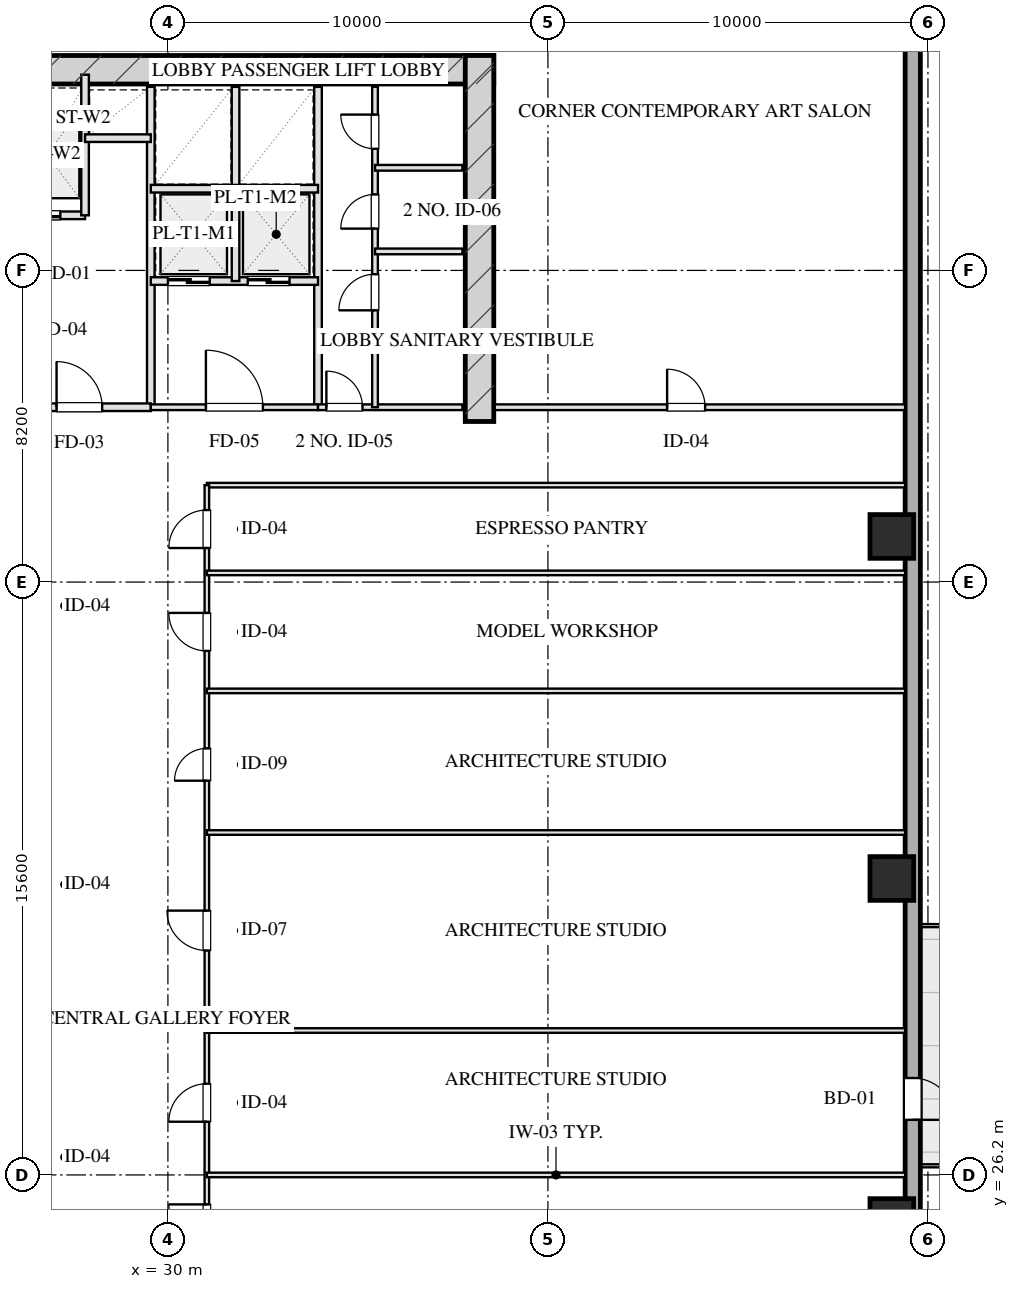
"""IFC4 building model, lengths in metres.
Left out: names, types, materials, properties, quantities, classifications, styles, units other than length and angle.
Written with IfcOpenShell. Run it as: python <this file> out.ifc"""

import sys

from ifc_helpers import new_model, si_unit, direction, frame, frame_2d, origin, origin_2d, place, context, subcontext, project, spatial, rectangle, hollow_rectangle, extrude, element, fill, save


model = new_model("IFC4")
c1 = context("Model", 3, precision=1e-05, world=origin(), true_north=direction((0.0, 1.0)))
c2 = subcontext(c1, "Body", "Model", "MODEL_VIEW")
j1 = project(units=[si_unit("LENGTHUNIT", "METRE"), si_unit("PLANEANGLEUNIT", "RADIAN")], contexts=[c1])
p1 = place(None, origin())
s1 = spatial("IfcSite", under=j1, at=p1, CompositionType="ELEMENT")
p2 = place(p1, origin())
s2 = spatial("IfcBuilding", under=s1, at=p2, CompositionType="ELEMENT")
p3 = place(p2, frame((0.0, 0.0, 60.95)))
s3 = spatial("IfcBuildingStorey", under=s2, at=p3, CompositionType="ELEMENT", Elevation=60.95)
p4 = place(p3, frame((21.425, 55.28, 0.0), z_axis=(0.0, 0.0, 1.0), x_axis=(1.0, 0.0, 0.0)))
e1 = element("IfcWall", 1, at=p4, inside=s3, PredefinedType="SHEAR", context=c2, shape_type="SweptSolid", body=[
    extrude(rectangle(XDim=17.15, YDim=0.75, at=frame_2d((8.575, 0.0))), origin(), (0.0, 0.0, 1.0), 3.45),
])
p5 = place(p3, frame((38.2, 46.025, 0.0), z_axis=(0.0, 0.0, 1.0), x_axis=(0.0, 1.0, 0.0)))
e2 = element("IfcWall", 2, at=p5, inside=s3, PredefinedType="SHEAR", context=c2, shape_type="SweptSolid", body=[
    extrude(rectangle(XDim=9.63, YDim=0.75, at=frame_2d((4.815, 0.0))), origin(), (0.0, 0.0, 1.0), 3.45),
])
for number, where, z_axis, x_axis in (
    (3, (49.05, 25.0, 0.0), (0.0, 0.0, 1.0), (1.0, 0.0, 0.0)),
    (4, (49.05, 34.0, 0.0), (0.0, 0.0, 1.0), (1.0, 0.0, 0.0)),
    (5, (49.05, 43.0, 0.0), (0.0, 0.0, 1.0), (1.0, 0.0, 0.0)),
):
    element("IfcColumn", number, at=place(p3, frame(where, z_axis=z_axis, x_axis=x_axis)), inside=s3, PredefinedType="COLUMN", context=c2, shape_type="SweptSolid", body=[
        extrude(hollow_rectangle(XDim=1.15, YDim=1.15, WallThickness=0.04, at=origin_2d()), origin(), (0.0, 0.0, 1.0), 3.451),
    ])
p6 = place(p3, frame((49.6, 60.8, 0.0), z_axis=(0.0, 0.0, 1.0), x_axis=(0.0, -1.0, 0.0)))
e6 = element("IfcWall", 6, at=p6, inside=s3, PredefinedType="SOLIDWALL", context=c2, shape_type="SweptSolid", body=[
    extrude(rectangle(XDim=53.6, YDim=0.4, at=frame_2d((26.8, 0.0))), origin(), (0.0, 0.0, 1.0), 2.61),
])
p7 = place(p6, frame((32.05, 0.0, 0.0)))
e7 = element("IfcOpeningElement", 7, at=p7, cuts=e6, PredefinedType="OPENING", context=c2, shape_type="SweptSolid", body=[
    extrude(rectangle(XDim=1.1, YDim=2.15, at=frame_2d((0.55, 1.075))), frame((0.0, 0.21, 0.0), z_axis=(0.0, -1.0, 0.0), x_axis=(1.0, 0.0, 0.0)), (0.0, 0.0, 1.0), 0.42),
])
p8 = place(p3, frame((29.55, 46.4, 0.0), z_axis=(0.0, 0.0, 1.0), x_axis=(0.0, 1.0, 0.0)))
e8 = element("IfcWall", 8, at=p8, inside=s3, PredefinedType="PARTITIONING", context=c2, shape_type="SweptSolid", body=[
    extrude(rectangle(XDim=8.43, YDim=0.2, at=frame_2d((4.215, 0.0))), origin(), (0.0, 0.0, 1.0), 3.175),
])
p9 = place(p3, frame((25.72, 46.4, 0.0), z_axis=(0.0, 0.0, 1.0), x_axis=(1.0, 0.0, 0.0)))
e9 = element("IfcWall", 9, at=p9, inside=s3, PredefinedType="PARTITIONING", context=c2, shape_type="SweptSolid", body=[
    extrude(rectangle(XDim=3.83, YDim=0.2, at=frame_2d((1.915, 0.0))), origin(), (0.0, 0.0, 1.0), 3.175),
])
p10 = place(p9, frame((1.35, 0.0, 0.0)))
e10 = element("IfcOpeningElement", 10, at=p10, cuts=e9, PredefinedType="OPENING", context=c2, shape_type="SweptSolid", body=[
    extrude(rectangle(XDim=1.2, YDim=2.05, at=frame_2d((0.6, 1.025))), frame((0.0, 0.11, 0.0), z_axis=(0.0, -1.0, 0.0), x_axis=(1.0, 0.0, 0.0)), (0.0, 0.0, 1.0), 0.22),
])
p11 = place(p3, frame((25.72, 51.45, 0.0), z_axis=(0.0, 0.0, 1.0), x_axis=(1.0, 0.0, 0.0)))
e11 = element("IfcWall", 11, at=p11, inside=s3, PredefinedType="PARTITIONING", context=c2, shape_type="SweptSolid", body=[
    extrude(rectangle(XDim=2.1, YDim=0.2, at=frame_2d((1.05, 0.0))), origin(), (0.0, 0.0, 1.0), 3.175),
])
p12 = place(p11, frame((0.35, 0.0, 0.0)))
e12 = element("IfcOpeningElement", 12, at=p12, cuts=e11, PredefinedType="OPENING", context=c2, shape_type="SweptSolid", body=[
    extrude(rectangle(XDim=1.1, YDim=2.05, at=frame_2d((0.55, 1.025))), frame((0.0, 0.11, 0.0), z_axis=(0.0, -1.0, 0.0), x_axis=(1.0, 0.0, 0.0)), (0.0, 0.0, 1.0), 0.22),
])
p13 = place(p3, frame((27.82, 51.45, 0.0), z_axis=(0.0, 0.0, 1.0), x_axis=(0.0, 1.0, 0.0)))
e13 = element("IfcWall", 13, at=p13, inside=s3, PredefinedType="PARTITIONING", context=c2, shape_type="SweptSolid", body=[
    extrude(rectangle(XDim=3.7, YDim=0.2, at=frame_2d((1.85, 0.0))), origin(), (0.0, 0.0, 1.0), 3.175),
])
p14 = place(p3, frame((27.82, 53.48, 0.0), z_axis=(0.0, 0.0, 1.0), x_axis=(1.0, 0.0, 0.0)))
e14 = element("IfcWall", 14, at=p14, inside=s3, PredefinedType="PARTITIONING", context=c2, shape_type="SweptSolid", body=[
    extrude(rectangle(XDim=1.73, YDim=0.2, at=frame_2d((0.865, 0.0))), origin(), (0.0, 0.0, 1.0), 3.175),
])
p15 = place(p3, frame((33.95, 46.4, 0.0), z_axis=(0.0, 0.0, 1.0), x_axis=(0.0, 1.0, 0.0)))
e15 = element("IfcWall", 15, at=p15, inside=s3, PredefinedType="PARTITIONING", context=c2, shape_type="SweptSolid", body=[
    extrude(rectangle(XDim=8.43, YDim=0.2, at=frame_2d((4.215, 0.0))), origin(), (0.0, 0.0, 1.0), 3.175),
])
p16 = place(p3, frame((29.55, 46.4, 0.0), z_axis=(0.0, 0.0, 1.0), x_axis=(1.0, 0.0, 0.0)))
e16 = element("IfcWall", 16, at=p16, inside=s3, PredefinedType="PARTITIONING", context=c2, shape_type="SweptSolid", body=[
    extrude(rectangle(XDim=4.4, YDim=0.15, at=frame_2d((2.2, 0.0))), origin(), (0.0, 0.0, 1.0), 3.175),
])
p17 = place(p16, frame((1.45, 0.0, 0.0)))
e17 = element("IfcOpeningElement", 17, at=p17, cuts=e16, PredefinedType="OPENING", context=c2, shape_type="SweptSolid", body=[
    extrude(rectangle(XDim=1.5, YDim=2.05, at=frame_2d((0.75, 1.025))), frame((0.0, 0.085, 0.0), z_axis=(0.0, -1.0, 0.0), x_axis=(1.0, 0.0, 0.0)), (0.0, 0.0, 1.0), 0.17),
])
p18 = place(p3, frame((29.55, 49.72, 0.0), z_axis=(0.0, 0.0, 1.0), x_axis=(1.0, 0.0, 0.0)))
e18 = element("IfcWall", 18, at=p18, inside=s3, PredefinedType="PARTITIONING", context=c2, shape_type="SweptSolid", body=[
    extrude(rectangle(XDim=4.4, YDim=0.2, at=frame_2d((2.2, 0.0))), origin(), (0.0, 0.0, 1.0), 3.175),
])
p19 = place(p18, frame((0.45, 0.0, 0.0)))
e19 = element("IfcOpeningElement", 19, at=p19, cuts=e18, PredefinedType="OPENING", context=c2, shape_type="SweptSolid", body=[
    extrude(rectangle(XDim=1.1, YDim=2.05, at=frame_2d((0.55, 1.025))), frame((0.0, 0.11, 0.0), z_axis=(0.0, -1.0, 0.0), x_axis=(1.0, 0.0, 0.0)), (0.0, 0.0, 1.0), 0.22),
])
p20 = place(p18, frame((2.55, 0.0, 0.0)))
e20 = element("IfcOpeningElement", 20, at=p20, cuts=e18, PredefinedType="OPENING", context=c2, shape_type="SweptSolid", body=[
    extrude(rectangle(XDim=1.1, YDim=2.05, at=frame_2d((0.55, 1.025))), frame((0.0, 0.11, 0.0), z_axis=(0.0, -1.0, 0.0), x_axis=(1.0, 0.0, 0.0)), (0.0, 0.0, 1.0), 0.22),
])
p21 = place(p3, frame((31.78, 49.72, 0.0), z_axis=(0.0, 0.0, 1.0), x_axis=(0.0, 1.0, 0.0)))
e21 = element("IfcWall", 21, at=p21, inside=s3, PredefinedType="PARTITIONING", context=c2, shape_type="SweptSolid", body=[
    extrude(rectangle(XDim=5.11, YDim=0.2, at=frame_2d((2.555, 0.0))), origin(), (0.0, 0.0, 1.0), 3.175),
])
p22 = place(p3, frame((29.55, 52.15, 0.0), z_axis=(0.0, 0.0, 1.0), x_axis=(1.0, 0.0, 0.0)))
e22 = element("IfcWall", 22, at=p22, inside=s3, PredefinedType="PARTITIONING", context=c2, shape_type="SweptSolid", body=[
    extrude(rectangle(XDim=4.4, YDim=0.2, at=frame_2d((2.2, 0.0))), origin(), (0.0, 0.0, 1.0), 3.175),
])
p23 = place(p3, frame((33.95, 46.4, 0.0), z_axis=(0.0, 0.0, 1.0), x_axis=(1.0, 0.0, 0.0)))
e23 = element("IfcWall", 23, at=p23, inside=s3, PredefinedType="PARTITIONING", context=c2, shape_type="SweptSolid", body=[
    extrude(rectangle(XDim=3.8, YDim=0.15, at=frame_2d((1.9, 0.0))), origin(), (0.0, 0.0, 1.0), 3.175),
])
p24 = place(p23, frame((0.22, 0.0, 0.0)))
e24 = element("IfcOpeningElement", 24, at=p24, cuts=e23, PredefinedType="OPENING", context=c2, shape_type="SweptSolid", body=[
    extrude(rectangle(XDim=0.95, YDim=2.05, at=frame_2d((0.475, 1.025))), frame((0.0, 0.085, 0.0), z_axis=(0.0, -1.0, 0.0), x_axis=(1.0, 0.0, 0.0)), (0.0, 0.0, 1.0), 0.17),
])
p25 = place(p3, frame((35.45, 46.4, 0.0), z_axis=(0.0, 0.0, 1.0), x_axis=(0.0, 1.0, 0.0)))
e25 = element("IfcWall", 25, at=p25, inside=s3, PredefinedType="PARTITIONING", context=c2, shape_type="SweptSolid", body=[
    extrude(rectangle(XDim=8.43, YDim=0.15, at=frame_2d((4.215, 0.0))), origin(), (0.0, 0.0, 1.0), 2.765),
])
p26 = place(p25, frame((2.55, 0.0, 0.0)))
e26 = element("IfcOpeningElement", 26, at=p26, cuts=e25, PredefinedType="OPENING", context=c2, shape_type="SweptSolid", body=[
    extrude(rectangle(XDim=0.95, YDim=2.05, at=frame_2d((0.475, 1.025))), frame((0.0, 0.085, 0.0), z_axis=(0.0, -1.0, 0.0), x_axis=(1.0, 0.0, 0.0)), (0.0, 0.0, 1.0), 0.17),
])
p27 = place(p25, frame((4.7, 0.0, 0.0)))
e27 = element("IfcOpeningElement", 27, at=p27, cuts=e25, PredefinedType="OPENING", context=c2, shape_type="SweptSolid", body=[
    extrude(rectangle(XDim=0.9, YDim=2.05, at=frame_2d((0.45, 1.025))), frame((0.0, 0.085, 0.0), z_axis=(0.0, -1.0, 0.0), x_axis=(1.0, 0.0, 0.0)), (0.0, 0.0, 1.0), 0.17),
])
p28 = place(p25, frame((6.8, 0.0, 0.0)))
e28 = element("IfcOpeningElement", 28, at=p28, cuts=e25, PredefinedType="OPENING", context=c2, shape_type="SweptSolid", body=[
    extrude(rectangle(XDim=0.9, YDim=2.05, at=frame_2d((0.45, 1.025))), frame((0.0, 0.085, 0.0), z_axis=(0.0, -1.0, 0.0), x_axis=(1.0, 0.0, 0.0)), (0.0, 0.0, 1.0), 0.17),
])
for number, where, z_axis, x_axis in (
    (29, (35.45, 50.5, 0.0), (0.0, 0.0, 1.0), (1.0, 0.0, 0.0)),
    (30, (35.45, 52.7, 0.0), (0.0, 0.0, 1.0), (1.0, 0.0, 0.0)),
):
    element("IfcWall", number, at=place(p3, frame(where, z_axis=z_axis, x_axis=x_axis)), inside=s3, PredefinedType="PARTITIONING", context=c2, shape_type="SweptSolid", body=[
        extrude(rectangle(XDim=2.3, YDim=0.15, at=frame_2d((1.15, 0.0))), origin(), (0.0, 0.0, 1.0), 3.175),
    ])
p29 = place(p3, frame((38.6, 46.4, 0.0), z_axis=(0.0, 0.0, 1.0), x_axis=(1.0, 0.0, 0.0)))
e31 = element("IfcWall", 31, at=p29, inside=s3, PredefinedType="PARTITIONING", context=c2, shape_type="SweptSolid", body=[
    extrude(rectangle(XDim=10.8, YDim=0.15, at=frame_2d((5.4, 0.0))), origin(), (0.0, 0.0, 1.0), 3.175),
])
p30 = place(p29, frame((4.536, 0.0, 0.0)))
e32 = element("IfcOpeningElement", 32, at=p30, cuts=e31, PredefinedType="OPENING", context=c2, shape_type="SweptSolid", body=[
    extrude(rectangle(XDim=1.0, YDim=2.05, at=frame_2d((0.5, 1.025))), frame((0.0, 0.085, 0.0), z_axis=(0.0, -1.0, 0.0), x_axis=(1.0, 0.0, 0.0)), (0.0, 0.0, 1.0), 0.17),
])
p31 = place(p3, frame((31.025, 44.35, 0.0), z_axis=(0.0, 0.0, 1.0), x_axis=(1.0, 0.0, 0.0)))
e33 = element("IfcWall", 33, at=p31, inside=s3, PredefinedType="PARTITIONING", context=c2, shape_type="SweptSolid", body=[
    extrude(rectangle(XDim=18.375, YDim=0.12, at=frame_2d((9.188, 0.0))), origin(), (0.0, 0.0, 1.0), 3.175),
])
p32 = place(p3, frame((31.025, 23.65, 0.0), z_axis=(0.0, 0.0, 1.0), x_axis=(0.0, 1.0, 0.0)))
e34 = element("IfcWall", 34, at=p32, inside=s3, PredefinedType="PARTITIONING", context=c2, shape_type="SweptSolid", body=[
    extrude(rectangle(XDim=20.7, YDim=0.12, at=frame_2d((10.35, 0.0))), origin(), (0.0, 0.0, 1.0), 3.175),
])
p33 = place(p32, frame((0.775, 0.0, 0.0)))
e35 = element("IfcOpeningElement", 35, at=p33, cuts=e34, PredefinedType="OPENING", context=c2, shape_type="SweptSolid", body=[
    extrude(rectangle(XDim=1.0, YDim=2.05, at=frame_2d((0.5, 1.025))), frame((0.0, 0.07, 0.0), z_axis=(0.0, -1.0, 0.0), x_axis=(1.0, 0.0, 0.0)), (0.0, 0.0, 1.0), 0.14),
])
p34 = place(p32, frame((3.95, 0.0, 0.0)))
e36 = element("IfcOpeningElement", 36, at=p34, cuts=e34, PredefinedType="OPENING", context=c2, shape_type="SweptSolid", body=[
    extrude(rectangle(XDim=1.0, YDim=2.05, at=frame_2d((0.5, 1.025))), frame((0.0, 0.07, 0.0), z_axis=(0.0, -1.0, 0.0), x_axis=(1.0, 0.0, 0.0)), (0.0, 0.0, 1.0), 0.14),
])
p35 = place(p32, frame((8.455, 0.0, 0.0)))
e37 = element("IfcOpeningElement", 37, at=p35, cuts=e34, PredefinedType="OPENING", context=c2, shape_type="SweptSolid", body=[
    extrude(rectangle(XDim=1.05, YDim=2.05, at=frame_2d((0.525, 1.025))), frame((0.0, 0.07, 0.0), z_axis=(0.0, -1.0, 0.0), x_axis=(1.0, 0.0, 0.0)), (0.0, 0.0, 1.0), 0.14),
])
p36 = place(p32, frame((12.923, 0.0, 0.0)))
e38 = element("IfcOpeningElement", 38, at=p36, cuts=e34, PredefinedType="OPENING", context=c2, shape_type="SweptSolid", body=[
    extrude(rectangle(XDim=0.85, YDim=2.05, at=frame_2d((0.425, 1.025))), frame((0.0, 0.07, 0.0), z_axis=(0.0, -1.0, 0.0), x_axis=(1.0, 0.0, 0.0)), (0.0, 0.0, 1.0), 0.14),
])
p37 = place(p32, frame((16.338, 0.0, 0.0)))
e39 = element("IfcOpeningElement", 39, at=p37, cuts=e34, PredefinedType="OPENING", context=c2, shape_type="SweptSolid", body=[
    extrude(rectangle(XDim=1.0, YDim=2.05, at=frame_2d((0.5, 1.025))), frame((0.0, 0.07, 0.0), z_axis=(0.0, -1.0, 0.0), x_axis=(1.0, 0.0, 0.0)), (0.0, 0.0, 1.0), 0.14),
])
p38 = place(p32, frame((19.045, 0.0, 0.0)))
e40 = element("IfcOpeningElement", 40, at=p38, cuts=e34, PredefinedType="OPENING", context=c2, shape_type="SweptSolid", body=[
    extrude(rectangle(XDim=1.0, YDim=2.05, at=frame_2d((0.5, 1.025))), frame((0.0, 0.07, 0.0), z_axis=(0.0, -1.0, 0.0), x_axis=(1.0, 0.0, 0.0)), (0.0, 0.0, 1.0), 0.14),
])
for number, where, z_axis, x_axis in (
    (41, (31.025, 26.2, 0.0), (0.0, 0.0, 1.0), (1.0, 0.0, 0.0)),
    (42, (31.025, 30.0, 0.0), (0.0, 0.0, 1.0), (1.0, 0.0, 0.0)),
    (43, (31.025, 35.21, 0.0), (0.0, 0.0, 1.0), (1.0, 0.0, 0.0)),
    (44, (31.025, 38.936, 0.0), (0.0, 0.0, 1.0), (1.0, 0.0, 0.0)),
    (45, (31.025, 42.041, 0.0), (0.0, 0.0, 1.0), (1.0, 0.0, 0.0)),
):
    element("IfcWall", number, at=place(p3, frame(where, z_axis=z_axis, x_axis=x_axis)), inside=s3, PredefinedType="PARTITIONING", context=c2, shape_type="SweptSolid", body=[
        extrude(rectangle(XDim=18.375, YDim=0.12, at=frame_2d((9.188, 0.0))), origin(), (0.0, 0.0, 1.0), 3.175),
    ])
p39 = place(p7, origin())
e46 = element("IfcDoor", 46, at=p39, inside=s3, OperationType="SINGLE_SWING_RIGHT", PredefinedType="DOOR", context=c2, shape_type="SweptSolid", body=[
    extrude(rectangle(XDim=1.1, YDim=2.15, at=frame_2d((0.55, 1.075))), frame((0.0, 0.025, 0.0), z_axis=(0.0, -1.0, 0.0), x_axis=(1.0, 0.0, 0.0)), (0.0, 0.0, 1.0), 0.05),
])
fill(e7, e46)
p40 = place(p10, origin())
e47 = element("IfcDoor", 47, at=p40, inside=s3, OperationType="SINGLE_SWING_LEFT", PredefinedType="DOOR", context=c2, shape_type="SweptSolid", body=[
    extrude(rectangle(XDim=1.2, YDim=2.05, at=frame_2d((0.6, 1.025))), frame((0.0, 0.025, 0.0), z_axis=(0.0, -1.0, 0.0), x_axis=(1.0, 0.0, 0.0)), (0.0, 0.0, 1.0), 0.05),
])
fill(e10, e47)
p41 = place(p12, origin())
e48 = element("IfcDoor", 48, at=p41, inside=s3, OperationType="DOUBLE_DOOR_SLIDING", PredefinedType="DOOR", context=c2, shape_type="SweptSolid", body=[
    extrude(rectangle(XDim=1.1, YDim=2.05, at=frame_2d((0.55, 1.025))), frame((0.0, 0.025, 0.0), z_axis=(0.0, -1.0, 0.0), x_axis=(1.0, 0.0, 0.0)), (0.0, 0.0, 1.0), 0.05),
])
fill(e12, e48)
p42 = place(p17, origin())
e49 = element("IfcDoor", 49, at=p42, inside=s3, OperationType="SINGLE_SWING_LEFT", PredefinedType="DOOR", context=c2, shape_type="SweptSolid", body=[
    extrude(rectangle(XDim=1.5, YDim=2.05, at=frame_2d((0.75, 1.025))), frame((0.0, 0.025, 0.0), z_axis=(0.0, -1.0, 0.0), x_axis=(1.0, 0.0, 0.0)), (0.0, 0.0, 1.0), 0.05),
])
fill(e17, e49)
p43 = place(p19, origin())
e50 = element("IfcDoor", 50, at=p43, inside=s3, OperationType="DOUBLE_DOOR_SLIDING", PredefinedType="DOOR", context=c2, shape_type="SweptSolid", body=[
    extrude(rectangle(XDim=1.1, YDim=2.05, at=frame_2d((0.55, 1.025))), frame((0.0, 0.025, 0.0), z_axis=(0.0, -1.0, 0.0), x_axis=(1.0, 0.0, 0.0)), (0.0, 0.0, 1.0), 0.05),
])
fill(e19, e50)
p44 = place(p20, origin())
e51 = element("IfcDoor", 51, at=p44, inside=s3, OperationType="DOUBLE_DOOR_SLIDING", PredefinedType="DOOR", context=c2, shape_type="SweptSolid", body=[
    extrude(rectangle(XDim=1.1, YDim=2.05, at=frame_2d((0.55, 1.025))), frame((0.0, 0.025, 0.0), z_axis=(0.0, -1.0, 0.0), x_axis=(1.0, 0.0, 0.0)), (0.0, 0.0, 1.0), 0.05),
])
fill(e20, e51)
p45 = place(p24, origin())
e52 = element("IfcDoor", 52, at=p45, inside=s3, OperationType="SINGLE_SWING_LEFT", PredefinedType="DOOR", context=c2, shape_type="SweptSolid", body=[
    extrude(rectangle(XDim=0.95, YDim=2.05, at=frame_2d((0.475, 1.025))), frame((0.0, 0.025, 0.0), z_axis=(0.0, -1.0, 0.0), x_axis=(1.0, 0.0, 0.0)), (0.0, 0.0, 1.0), 0.05),
])
fill(e24, e52)
p46 = place(p26, origin())
e53 = element("IfcDoor", 53, at=p46, inside=s3, OperationType="SINGLE_SWING_LEFT", PredefinedType="DOOR", context=c2, shape_type="SweptSolid", body=[
    extrude(rectangle(XDim=0.95, YDim=2.05, at=frame_2d((0.475, 1.025))), frame((0.0, 0.025, 0.0), z_axis=(0.0, -1.0, 0.0), x_axis=(1.0, 0.0, 0.0)), (0.0, 0.0, 1.0), 0.05),
])
fill(e26, e53)
p47 = place(p27, origin())
e54 = element("IfcDoor", 54, at=p47, inside=s3, OperationType="SINGLE_SWING_LEFT", PredefinedType="DOOR", context=c2, shape_type="SweptSolid", body=[
    extrude(rectangle(XDim=0.9, YDim=2.05, at=frame_2d((0.45, 1.025))), frame((0.0, 0.025, 0.0), z_axis=(0.0, -1.0, 0.0), x_axis=(1.0, 0.0, 0.0)), (0.0, 0.0, 1.0), 0.05),
])
fill(e27, e54)
p48 = place(p28, origin())
e55 = element("IfcDoor", 55, at=p48, inside=s3, OperationType="SINGLE_SWING_RIGHT", PredefinedType="DOOR", context=c2, shape_type="SweptSolid", body=[
    extrude(rectangle(XDim=0.9, YDim=2.05, at=frame_2d((0.45, 1.025))), frame((0.0, 0.025, 0.0), z_axis=(0.0, -1.0, 0.0), x_axis=(1.0, 0.0, 0.0)), (0.0, 0.0, 1.0), 0.05),
])
fill(e28, e55)
p49 = place(p30, origin())
e56 = element("IfcDoor", 56, at=p49, inside=s3, OperationType="SINGLE_SWING_LEFT", PredefinedType="DOOR", context=c2, shape_type="SweptSolid", body=[
    extrude(rectangle(XDim=1.0, YDim=2.05, at=frame_2d((0.5, 1.025))), frame((0.0, 0.025, 0.0), z_axis=(0.0, -1.0, 0.0), x_axis=(1.0, 0.0, 0.0)), (0.0, 0.0, 1.0), 0.05),
])
fill(e32, e56)
p50 = place(p33, origin())
e57 = element("IfcDoor", 57, at=p50, inside=s3, OperationType="SINGLE_SWING_RIGHT", PredefinedType="DOOR", context=c2, shape_type="SweptSolid", body=[
    extrude(rectangle(XDim=1.0, YDim=2.05, at=frame_2d((0.5, 1.025))), frame((0.0, 0.025, 0.0), z_axis=(0.0, -1.0, 0.0), x_axis=(1.0, 0.0, 0.0)), (0.0, 0.0, 1.0), 0.05),
])
fill(e35, e57)
p51 = place(p34, origin())
e58 = element("IfcDoor", 58, at=p51, inside=s3, OperationType="SINGLE_SWING_LEFT", PredefinedType="DOOR", context=c2, shape_type="SweptSolid", body=[
    extrude(rectangle(XDim=1.0, YDim=2.05, at=frame_2d((0.5, 1.025))), frame((0.0, 0.025, 0.0), z_axis=(0.0, -1.0, 0.0), x_axis=(1.0, 0.0, 0.0)), (0.0, 0.0, 1.0), 0.05),
])
fill(e36, e58)
p52 = place(p35, origin())
e59 = element("IfcDoor", 59, at=p52, inside=s3, OperationType="SINGLE_SWING_RIGHT", PredefinedType="DOOR", context=c2, shape_type="SweptSolid", body=[
    extrude(rectangle(XDim=1.05, YDim=2.05, at=frame_2d((0.525, 1.025))), frame((0.0, 0.025, 0.0), z_axis=(0.0, -1.0, 0.0), x_axis=(1.0, 0.0, 0.0)), (0.0, 0.0, 1.0), 0.05),
])
fill(e37, e59)
p53 = place(p36, origin())
e60 = element("IfcDoor", 60, at=p53, inside=s3, OperationType="SINGLE_SWING_LEFT", PredefinedType="DOOR", context=c2, shape_type="SweptSolid", body=[
    extrude(rectangle(XDim=0.85, YDim=2.05, at=frame_2d((0.425, 1.025))), frame((0.0, 0.025, 0.0), z_axis=(0.0, -1.0, 0.0), x_axis=(1.0, 0.0, 0.0)), (0.0, 0.0, 1.0), 0.05),
])
fill(e38, e60)
p54 = place(p37, origin())
e61 = element("IfcDoor", 61, at=p54, inside=s3, OperationType="SINGLE_SWING_RIGHT", PredefinedType="DOOR", context=c2, shape_type="SweptSolid", body=[
    extrude(rectangle(XDim=1.0, YDim=2.05, at=frame_2d((0.5, 1.025))), frame((0.0, 0.025, 0.0), z_axis=(0.0, -1.0, 0.0), x_axis=(1.0, 0.0, 0.0)), (0.0, 0.0, 1.0), 0.05),
])
fill(e39, e61)
p55 = place(p38, origin())
e62 = element("IfcDoor", 62, at=p55, inside=s3, OperationType="SINGLE_SWING_LEFT", PredefinedType="DOOR", context=c2, shape_type="SweptSolid", body=[
    extrude(rectangle(XDim=1.0, YDim=2.05, at=frame_2d((0.5, 1.025))), frame((0.0, 0.025, 0.0), z_axis=(0.0, -1.0, 0.0), x_axis=(1.0, 0.0, 0.0)), (0.0, 0.0, 1.0), 0.05),
])
fill(e40, e62)
save(model, sys.argv[1])
